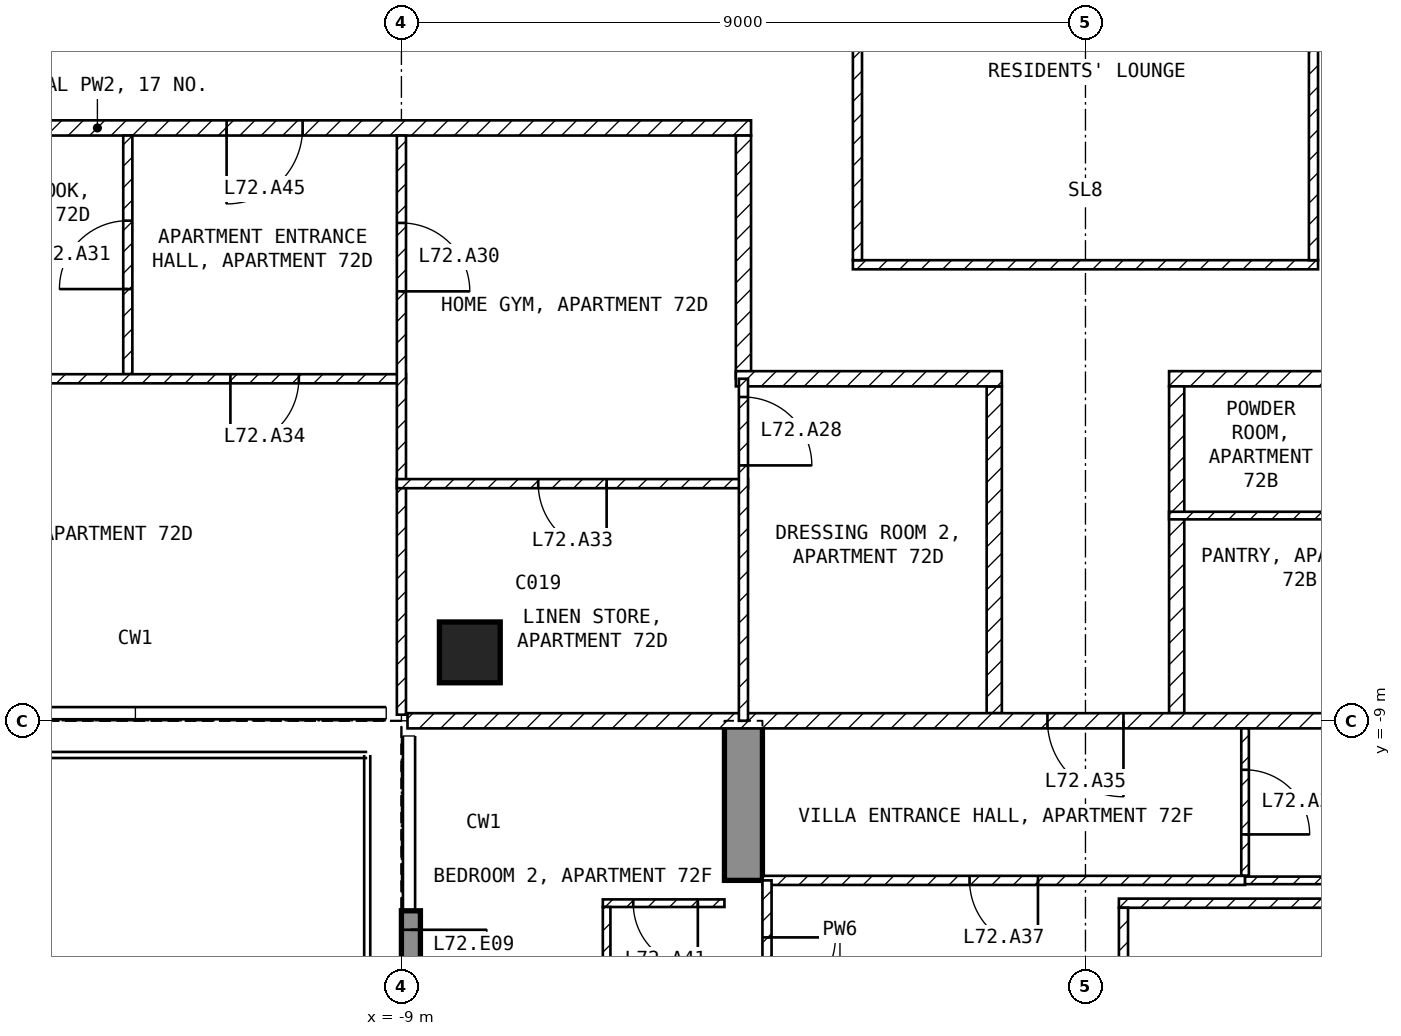
"""IFC4 building model, lengths in metres.
Left out: names, types, materials, properties, quantities, classifications, styles, units other than length and angle.
Written with IfcOpenShell. Run it as: python <this file> out.ifc"""

import sys

from ifc_helpers import new_model, si_unit, direction, frame, frame_2d, origin, origin_2d, place, context, subcontext, project, spatial, polyline, rectangle, outline, extrude, element, fill, save


model = new_model("IFC4")
c1 = context("Model", 3, precision=1e-05, world=origin(), true_north=direction((0.0, 1.0)))
c2 = subcontext(c1, "Body", "Model", "MODEL_VIEW")
j1 = project(units=[si_unit("LENGTHUNIT", "METRE"), si_unit("PLANEANGLEUNIT", "RADIAN")], contexts=[c1])
p1 = place(None, origin())
s1 = spatial("IfcSite", under=j1, at=p1, CompositionType="ELEMENT")
p2 = place(p1, origin())
s2 = spatial("IfcBuilding", under=s1, at=p2, CompositionType="ELEMENT")
p3 = place(p2, frame((0.0, 0.0, 281.5)))
s3 = spatial("IfcBuildingStorey", under=s2, at=p3, CompositionType="ELEMENT", Elevation=281.5)
p4 = place(p3, frame((-8.1, -8.1, -0.25), z_axis=(0.0, 0.0, 1.0), x_axis=(1.0, 0.0, 0.0)))
e1 = element("IfcColumn", 1, at=p4, inside=s3, PredefinedType="COLUMN", context=c2, shape_type="SweptSolid", body=[
    extrude(rectangle(XDim=0.8, YDim=0.8, at=origin_2d()), origin(), (0.0, 0.0, 1.0), 3.45),
])
p5 = place(p3, frame((-4.75, -16.7, -0.25), z_axis=(1.0, 0.0, 0.0), x_axis=(0.0, 1.0, 0.0)))
e2 = element("IfcWall", 2, at=p5, inside=s3, PredefinedType="SHEAR", context=c2, shape_type="SweptSolid", body=[
    extrude(outline(polyline([(0.0, 0.0), (3.2, 0.0), (3.2, 2.65), (5.6, 2.65), (5.6, 0.0), (7.7, 0.0), (7.7, 3.45), (0.0, 3.45), (0.0, 0.0)])), origin(), (0.0, 0.0, 1.0), 0.5),
])
p6 = place(p3, frame((-8.875, -11.5, 0.0), z_axis=(0.0, 0.0, 1.0), x_axis=(0.0, -1.0, 0.0)))
e3 = element("IfcWall", 3, at=p6, inside=s3, PredefinedType="SOLIDWALL", context=c2, shape_type="SweptSolid", body=[
    extrude(rectangle(XDim=2.7, YDim=0.25, at=frame_2d((1.35, 0.0))), origin(), (0.0, 0.0, 1.0), 3.2),
])
p7 = place(p6, frame((0.25, 0.0, 0.0)))
e4 = element("IfcOpeningElement", 4, at=p7, cuts=e3, PredefinedType="OPENING", context=c2, shape_type="SweptSolid", body=[
    extrude(rectangle(XDim=1.0, YDim=2.4, at=frame_2d((0.5, 1.2))), frame((0.0, 0.135, 0.0), z_axis=(0.0, -1.0, 0.0), x_axis=(1.0, 0.0, 0.0)), (0.0, 0.0, 1.0), 0.27),
])
p8 = place(p3, frame((-3.06, -3.0, 0.0), z_axis=(0.0, 0.0, 1.0), x_axis=(1.0, 0.0, 0.0)))
e5 = element("IfcWall", 5, at=p8, inside=s3, PredefinedType="PARTITIONING", context=c2, shape_type="SweptSolid", body=[
    extrude(rectangle(XDim=6.12, YDim=0.12, at=frame_2d((3.06, 0.0))), origin(), (0.0, 0.0, 1.0), 3.2),
])
for number, where, z_axis, x_axis in (
    (6, (3.0, -2.94, 0.0), (0.0, 0.0, 1.0), (0.0, 1.0, 0.0)),
    (7, (-3.0, 2.94, 0.0), (0.0, 0.0, 1.0), (0.0, -1.0, 0.0)),
):
    element("IfcWall", number, at=place(p3, frame(where, z_axis=z_axis, x_axis=x_axis)), inside=s3, PredefinedType="PARTITIONING", context=c2, shape_type="SweptSolid", body=[
        extrude(rectangle(XDim=5.88, YDim=0.12, at=frame_2d((2.94, 0.0))), origin(), (0.0, 0.0, 1.0), 3.2),
    ])
p9 = place(p3, frame((4.6, -4.5, 0.0), z_axis=(0.0, 0.0, 1.0), x_axis=(-1.0, 0.0, 0.0)))
e8 = element("IfcWall", 8, at=p9, inside=s3, PredefinedType="PARTITIONING", context=c2, shape_type="SweptSolid", body=[
    extrude(rectangle(XDim=3.5, YDim=0.2, at=frame_2d((1.75, 0.0))), origin(), (0.0, 0.0, 1.0), 3.2),
])
p10 = place(p3, frame((1.2, -4.6, 0.0), z_axis=(0.0, 0.0, 1.0), x_axis=(0.0, -1.0, 0.0)))
e9 = element("IfcWall", 9, at=p10, inside=s3, PredefinedType="PARTITIONING", context=c2, shape_type="SweptSolid", body=[
    extrude(rectangle(XDim=4.3, YDim=0.2, at=frame_2d((2.15, 0.0))), origin(), (0.0, 0.0, 1.0), 3.2),
])
p11 = place(p3, frame((-4.4, -1.2, 0.0), z_axis=(0.0, 0.0, 1.0), x_axis=(-1.0, 0.0, 0.0)))
e10 = element("IfcWall", 10, at=p11, inside=s3, PredefinedType="PARTITIONING", context=c2, shape_type="SweptSolid", body=[
    extrude(rectangle(XDim=17.2, YDim=0.2, at=frame_2d((8.6, 0.0))), origin(), (0.0, 0.0, 1.0), 3.2),
])
p12 = place(p11, frame((5.9, 0.0, 0.0)))
e11 = element("IfcOpeningElement", 11, at=p12, cuts=e10, PredefinedType="OPENING", context=c2, shape_type="SweptSolid", body=[
    extrude(rectangle(XDim=1.0, YDim=2.1, at=frame_2d((0.5, 1.05))), frame((0.0, 0.11, 0.0), z_axis=(0.0, -1.0, 0.0), x_axis=(1.0, 0.0, 0.0)), (0.0, 0.0, 1.0), 0.22),
])
p13 = place(p3, frame((-4.5, -4.5, 0.0), z_axis=(0.0, 0.0, 1.0), x_axis=(0.0, 1.0, 0.0)))
e12 = element("IfcWall", 12, at=p13, inside=s3, PredefinedType="PARTITIONING", context=c2, shape_type="SweptSolid", body=[
    extrude(rectangle(XDim=3.2, YDim=0.2, at=frame_2d((1.6, 0.0))), origin(), (0.0, 0.0, 1.0), 3.2),
])
p14 = place(p3, frame((-1.2, -8.9, 0.0), z_axis=(0.0, 0.0, 1.0), x_axis=(0.0, 1.0, 0.0)))
e13 = element("IfcWall", 13, at=p14, inside=s3, PredefinedType="PARTITIONING", context=c2, shape_type="SweptSolid", body=[
    extrude(rectangle(XDim=4.3, YDim=0.2, at=frame_2d((2.15, 0.0))), origin(), (0.0, 0.0, 1.0), 3.2),
])
p15 = place(p3, frame((-1.1, -4.5, 0.0), z_axis=(0.0, 0.0, 1.0), x_axis=(-1.0, 0.0, 0.0)))
e14 = element("IfcWall", 14, at=p15, inside=s3, PredefinedType="PARTITIONING", context=c2, shape_type="SweptSolid", body=[
    extrude(rectangle(XDim=3.5, YDim=0.2, at=frame_2d((1.75, 0.0))), origin(), (0.0, 0.0, 1.0), 3.2),
])
p16 = place(p3, frame((8.92, -9.0, 0.0), z_axis=(0.0, 0.0, 1.0), x_axis=(-1.0, 0.0, 0.0)))
e15 = element("IfcWall", 15, at=p16, inside=s3, PredefinedType="PARTITIONING", context=c2, shape_type="SweptSolid", body=[
    extrude(rectangle(XDim=17.84, YDim=0.2, at=frame_2d((8.92, 0.0))), origin(), (0.0, 0.0, 1.0), 3.2),
])
p17 = place(p16, frame((8.42, 0.0, 0.0)))
e16 = element("IfcOpeningElement", 16, at=p17, cuts=e15, PredefinedType="OPENING", context=c2, shape_type="SweptSolid", body=[
    extrude(rectangle(XDim=1.0, YDim=2.1, at=frame_2d((0.5, 1.05))), frame((0.0, 0.11, 0.0), z_axis=(0.0, -1.0, 0.0), x_axis=(1.0, 0.0, 0.0)), (0.0, 0.0, 1.0), 0.22),
])
p18 = place(p3, frame((4.56, -6.3, 0.0), z_axis=(0.0, 0.0, 1.0), x_axis=(-1.0, 0.0, 0.0)))
e17 = element("IfcWall", 17, at=p18, inside=s3, PredefinedType="PARTITIONING", context=c2, shape_type="SweptSolid", body=[
    extrude(rectangle(XDim=3.46, YDim=0.1, at=frame_2d((1.73, 0.0))), origin(), (0.0, 0.0, 1.0), 3.2),
])
p19 = place(p3, frame((-12.6, -4.44, 0.0), z_axis=(0.0, 0.0, 1.0), x_axis=(0.0, 1.0, 0.0)))
e18 = element("IfcWall", 18, at=p19, inside=s3, PredefinedType="PARTITIONING", context=c2, shape_type="SweptSolid", body=[
    extrude(rectangle(XDim=3.14, YDim=0.12, at=frame_2d((1.57, 0.0))), origin(), (0.0, 0.0, 1.0), 3.2),
])
p20 = place(p19, frame((1.12, 0.0, 0.0)))
e19 = element("IfcOpeningElement", 19, at=p20, cuts=e18, PredefinedType="OPENING", context=c2, shape_type="SweptSolid", body=[
    extrude(rectangle(XDim=0.9, YDim=2.1, at=frame_2d((0.45, 1.05))), frame((0.0, 0.07, 0.0), z_axis=(0.0, -1.0, 0.0), x_axis=(1.0, 0.0, 0.0)), (0.0, 0.0, 1.0), 0.14),
])
p21 = place(p3, frame((-8.94, -4.5, 0.0), z_axis=(0.0, 0.0, 1.0), x_axis=(-1.0, 0.0, 0.0)))
e20 = element("IfcWall", 20, at=p21, inside=s3, PredefinedType="PARTITIONING", context=c2, shape_type="SweptSolid", body=[
    extrude(rectangle(XDim=8.46, YDim=0.12, at=frame_2d((4.23, 0.0))), origin(), (0.0, 0.0, 1.0), 3.2),
])
p22 = place(p21, frame((7.11, 0.0, 0.0)))
e21 = element("IfcOpeningElement", 21, at=p22, cuts=e20, PredefinedType="OPENING", context=c2, shape_type="SweptSolid", body=[
    extrude(rectangle(XDim=0.9, YDim=2.1, at=frame_2d((0.45, 1.05))), frame((0.0, 0.07, 0.0), z_axis=(0.0, -1.0, 0.0), x_axis=(1.0, 0.0, 0.0)), (0.0, 0.0, 1.0), 0.14),
])
p23 = place(p21, frame((1.41, 0.0, 0.0)))
e22 = element("IfcOpeningElement", 22, at=p23, cuts=e20, PredefinedType="OPENING", context=c2, shape_type="SweptSolid", body=[
    extrude(rectangle(XDim=0.9, YDim=2.1, at=frame_2d((0.45, 1.05))), frame((0.0, 0.07, 0.0), z_axis=(0.0, -1.0, 0.0), x_axis=(1.0, 0.0, 0.0)), (0.0, 0.0, 1.0), 0.14),
])
p24 = place(p3, frame((-9.0, -1.3, 0.0), z_axis=(0.0, 0.0, 1.0), x_axis=(0.0, -1.0, 0.0)))
e23 = element("IfcWall", 23, at=p24, inside=s3, PredefinedType="PARTITIONING", context=c2, shape_type="SweptSolid", body=[
    extrude(rectangle(XDim=7.62, YDim=0.12, at=frame_2d((3.81, 0.0))), origin(), (0.0, 0.0, 1.0), 3.2),
])
p25 = place(p24, frame((1.15, 0.0, 0.0)))
e24 = element("IfcOpeningElement", 24, at=p25, cuts=e23, PredefinedType="OPENING", context=c2, shape_type="SweptSolid", body=[
    extrude(rectangle(XDim=0.9, YDim=2.1, at=frame_2d((0.45, 1.05))), frame((0.0, 0.07, 0.0), z_axis=(0.0, -1.0, 0.0), x_axis=(1.0, 0.0, 0.0)), (0.0, 0.0, 1.0), 0.14),
])
p26 = place(p3, frame((-4.44, -5.88, 0.0), z_axis=(0.0, 0.0, 1.0), x_axis=(-1.0, 0.0, 0.0)))
e25 = element("IfcWall", 25, at=p26, inside=s3, PredefinedType="PARTITIONING", context=c2, shape_type="SweptSolid", body=[
    extrude(rectangle(XDim=4.62, YDim=0.12, at=frame_2d((2.31, 0.0))), origin(), (0.0, 0.0, 1.0), 3.2),
])
p27 = place(p26, frame((1.86, 0.0, 0.0)))
e26 = element("IfcOpeningElement", 26, at=p27, cuts=e25, PredefinedType="OPENING", context=c2, shape_type="SweptSolid", body=[
    extrude(rectangle(XDim=0.9, YDim=2.1, at=frame_2d((0.45, 1.05))), frame((0.0, 0.07, 0.0), z_axis=(0.0, -1.0, 0.0), x_axis=(1.0, 0.0, 0.0)), (0.0, 0.0, 1.0), 0.14),
])
p28 = place(p3, frame((-4.5, -4.5, 0.0), z_axis=(0.0, 0.0, 1.0), x_axis=(0.0, -1.0, 0.0)))
e27 = element("IfcWall", 27, at=p28, inside=s3, PredefinedType="PARTITIONING", context=c2, shape_type="SweptSolid", body=[
    extrude(rectangle(XDim=4.5, YDim=0.12, at=frame_2d((2.25, 0.0))), origin(), (0.0, 0.0, 1.0), 3.2),
])
p29 = place(p28, frame((0.24, 0.0, 0.0)))
e28 = element("IfcOpeningElement", 28, at=p29, cuts=e27, PredefinedType="OPENING", context=c2, shape_type="SweptSolid", body=[
    extrude(rectangle(XDim=0.9, YDim=2.1, at=frame_2d((0.45, 1.05))), frame((0.0, 0.07, 0.0), z_axis=(0.0, -1.0, 0.0), x_axis=(1.0, 0.0, 0.0)), (0.0, 0.0, 1.0), 0.14),
])
p30 = place(p3, frame((2.1, -9.1, 0.0), z_axis=(0.0, 0.0, 1.0), x_axis=(0.0, -1.0, 0.0)))
e29 = element("IfcWall", 29, at=p30, inside=s3, PredefinedType="PARTITIONING", context=c2, shape_type="SweptSolid", body=[
    extrude(rectangle(XDim=1.94, YDim=0.1, at=frame_2d((0.97, 0.0))), origin(), (0.0, 0.0, 1.0), 3.2),
])
p31 = place(p30, frame((0.545, 0.0, 0.0)))
e30 = element("IfcOpeningElement", 30, at=p31, cuts=e29, PredefinedType="OPENING", context=c2, shape_type="SweptSolid", body=[
    extrude(rectangle(XDim=0.85, YDim=2.1, at=frame_2d((0.425, 1.05))), frame((0.0, 0.06, 0.0), z_axis=(0.0, -1.0, 0.0), x_axis=(1.0, 0.0, 0.0)), (0.0, 0.0, 1.0), 0.12),
])
p32 = place(p3, frame((2.1, -11.1, 0.0), z_axis=(0.0, 0.0, 1.0), x_axis=(-1.0, 0.0, 0.0)))
e31 = element("IfcWall", 31, at=p32, inside=s3, PredefinedType="PARTITIONING", context=c2, shape_type="SweptSolid", body=[
    extrude(rectangle(XDim=6.35, YDim=0.12, at=frame_2d((3.175, 0.0))), origin(), (0.0, 0.0, 1.0), 3.2),
])
p33 = place(p32, frame((2.725, 0.0, 0.0)))
e32 = element("IfcOpeningElement", 32, at=p33, cuts=e31, PredefinedType="OPENING", context=c2, shape_type="SweptSolid", body=[
    extrude(rectangle(XDim=0.9, YDim=2.1, at=frame_2d((0.45, 1.05))), frame((0.0, 0.07, 0.0), z_axis=(0.0, -1.0, 0.0), x_axis=(1.0, 0.0, 0.0)), (0.0, 0.0, 1.0), 0.14),
])
p34 = place(p3, frame((4.25, -11.1, 0.0), z_axis=(0.0, 0.0, 1.0), x_axis=(-1.0, 0.0, 0.0)))
e33 = element("IfcWall", 33, at=p34, inside=s3, PredefinedType="PARTITIONING", context=c2, shape_type="SweptSolid", body=[
    extrude(rectangle(XDim=2.15, YDim=0.1, at=frame_2d((1.075, 0.0))), origin(), (0.0, 0.0, 1.0), 3.2),
])
p35 = place(p3, frame((4.25, -11.4, 0.0), z_axis=(0.0, 0.0, 1.0), x_axis=(-1.0, 0.0, 0.0)))
e34 = element("IfcWall", 34, at=p35, inside=s3, PredefinedType="PARTITIONING", context=c2, shape_type="SweptSolid", body=[
    extrude(rectangle(XDim=3.81, YDim=0.12, at=frame_2d((1.905, 0.0))), origin(), (0.0, 0.0, 1.0), 3.2),
])
p36 = place(p3, frame((0.5, -11.46, 0.0), z_axis=(0.0, 0.0, 1.0), x_axis=(0.0, -1.0, 0.0)))
e35 = element("IfcWall", 35, at=p36, inside=s3, PredefinedType="PARTITIONING", context=c2, shape_type="SweptSolid", body=[
    extrude(rectangle(XDim=2.88, YDim=0.12, at=frame_2d((1.44, 0.0))), origin(), (0.0, 0.0, 1.0), 3.2),
])
p37 = place(p36, frame((0.99, 0.0, 0.0)))
e36 = element("IfcOpeningElement", 36, at=p37, cuts=e35, PredefinedType="OPENING", context=c2, shape_type="SweptSolid", body=[
    extrude(rectangle(XDim=0.9, YDim=2.1, at=frame_2d((0.45, 1.05))), frame((0.0, 0.07, 0.0), z_axis=(0.0, -1.0, 0.0), x_axis=(1.0, 0.0, 0.0)), (0.0, 0.0, 1.0), 0.14),
])
p38 = place(p3, frame((-4.75, -11.4, 0.0), z_axis=(0.0, 0.0, 1.0), x_axis=(-1.0, 0.0, 0.0)))
e37 = element("IfcWall", 37, at=p38, inside=s3, PredefinedType="PARTITIONING", context=c2, shape_type="SweptSolid", body=[
    extrude(rectangle(XDim=1.6, YDim=0.1, at=frame_2d((0.8, 0.0))), origin(), (0.0, 0.0, 1.0), 3.2),
])
p39 = place(p38, frame((0.35, 0.0, 0.0)))
e38 = element("IfcOpeningElement", 38, at=p39, cuts=e37, PredefinedType="OPENING", context=c2, shape_type="SweptSolid", body=[
    extrude(rectangle(XDim=0.85, YDim=2.1, at=frame_2d((0.425, 1.05))), frame((0.0, 0.06, 0.0), z_axis=(0.0, -1.0, 0.0), x_axis=(1.0, 0.0, 0.0)), (0.0, 0.0, 1.0), 0.12),
])
p40 = place(p3, frame((-6.3, -11.45, 0.0), z_axis=(0.0, 0.0, 1.0), x_axis=(0.0, -1.0, 0.0)))
e39 = element("IfcWall", 39, at=p40, inside=s3, PredefinedType="PARTITIONING", context=c2, shape_type="SweptSolid", body=[
    extrude(rectangle(XDim=2.89, YDim=0.1, at=frame_2d((1.445, 0.0))), origin(), (0.0, 0.0, 1.0), 3.2),
])
p41 = place(p3, frame((-4.19, -11.1, 0.0), z_axis=(0.0, 0.0, 1.0), x_axis=(0.0, -1.0, 0.0)))
e40 = element("IfcWall", 40, at=p41, inside=s3, PredefinedType="PARTITIONING", context=c2, shape_type="SweptSolid", body=[
    extrude(rectangle(XDim=2.4, YDim=0.12, at=frame_2d((1.2, 0.0))), origin(), (0.0, 0.0, 1.0), 2.4),
])
p42 = place(p41, frame((0.75, 0.0, 0.0)))
e41 = element("IfcOpeningElement", 41, at=p42, cuts=e40, PredefinedType="OPENING", context=c2, shape_type="SweptSolid", body=[
    extrude(rectangle(XDim=0.9, YDim=2.1, at=frame_2d((0.45, 1.05))), frame((0.0, 0.07, 0.0), z_axis=(0.0, -1.0, 0.0), x_axis=(1.0, 0.0, 0.0)), (0.0, 0.0, 1.0), 0.14),
])
p43 = place(p7, origin())
e42 = element("IfcDoor", 42, at=p43, inside=s3, OperationType="SINGLE_SWING_LEFT", PredefinedType="DOOR", context=c2, shape_type="SweptSolid", body=[
    extrude(rectangle(XDim=1.0, YDim=2.4, at=frame_2d((0.5, 1.2))), frame((0.0, 0.025, 0.0), z_axis=(0.0, -1.0, 0.0), x_axis=(1.0, 0.0, 0.0)), (0.0, 0.0, 1.0), 0.05),
])
fill(e4, e42)
p44 = place(p29, origin())
e43 = element("IfcDoor", 43, at=p44, inside=s3, OperationType="SINGLE_SWING_RIGHT", PredefinedType="DOOR", context=c2, shape_type="SweptSolid", body=[
    extrude(rectangle(XDim=0.9, YDim=2.1, at=frame_2d((0.45, 1.05))), frame((0.0, 0.025, 0.0), z_axis=(0.0, -1.0, 0.0), x_axis=(1.0, 0.0, 0.0)), (0.0, 0.0, 1.0), 0.05),
])
fill(e28, e43)
p45 = place(p25, origin())
e44 = element("IfcDoor", 44, at=p45, inside=s3, OperationType="SINGLE_SWING_RIGHT", PredefinedType="DOOR", context=c2, shape_type="SweptSolid", body=[
    extrude(rectangle(XDim=0.9, YDim=2.1, at=frame_2d((0.45, 1.05))), frame((0.0, 0.025, 0.0), z_axis=(0.0, -1.0, 0.0), x_axis=(1.0, 0.0, 0.0)), (0.0, 0.0, 1.0), 0.05),
])
fill(e24, e44)
p46 = place(p20, origin())
e45 = element("IfcDoor", 45, at=p46, inside=s3, OperationType="SINGLE_SWING_LEFT", PredefinedType="DOOR", context=c2, shape_type="SweptSolid", body=[
    extrude(rectangle(XDim=0.9, YDim=2.1, at=frame_2d((0.45, 1.05))), frame((0.0, 0.025, 0.0), z_axis=(0.0, -1.0, 0.0), x_axis=(1.0, 0.0, 0.0)), (0.0, 0.0, 1.0), 0.05),
])
fill(e19, e45)
p47 = place(p27, origin())
e46 = element("IfcDoor", 46, at=p47, inside=s3, OperationType="SINGLE_SWING_LEFT", PredefinedType="DOOR", context=c2, shape_type="SweptSolid", body=[
    extrude(rectangle(XDim=0.9, YDim=2.1, at=frame_2d((0.45, 1.05))), frame((0.0, 0.025, 0.0), z_axis=(0.0, -1.0, 0.0), x_axis=(1.0, 0.0, 0.0)), (0.0, 0.0, 1.0), 0.05),
])
fill(e26, e46)
p48 = place(p23, origin())
e47 = element("IfcDoor", 47, at=p48, inside=s3, OperationType="SINGLE_SWING_RIGHT", PredefinedType="DOOR", context=c2, shape_type="SweptSolid", body=[
    extrude(rectangle(XDim=0.9, YDim=2.1, at=frame_2d((0.45, 1.05))), frame((0.0, 0.025, 0.0), z_axis=(0.0, -1.0, 0.0), x_axis=(1.0, 0.0, 0.0)), (0.0, 0.0, 1.0), 0.05),
])
fill(e22, e47)
p49 = place(p17, origin())
e48 = element("IfcDoor", 48, at=p49, inside=s3, OperationType="SINGLE_SWING_LEFT", PredefinedType="DOOR", context=c2, shape_type="SweptSolid", body=[
    extrude(rectangle(XDim=1.0, YDim=2.1, at=frame_2d((0.5, 1.05))), frame((0.0, 0.025, 0.0), z_axis=(0.0, -1.0, 0.0), x_axis=(1.0, 0.0, 0.0)), (0.0, 0.0, 1.0), 0.05),
])
fill(e16, e48)
p50 = place(p31, origin())
e49 = element("IfcDoor", 49, at=p50, inside=s3, OperationType="SINGLE_SWING_RIGHT", PredefinedType="DOOR", context=c2, shape_type="SweptSolid", body=[
    extrude(rectangle(XDim=0.85, YDim=2.1, at=frame_2d((0.425, 1.05))), frame((0.0, 0.025, 0.0), z_axis=(0.0, -1.0, 0.0), x_axis=(1.0, 0.0, 0.0)), (0.0, 0.0, 1.0), 0.05),
])
fill(e30, e49)
p51 = place(p33, origin())
e50 = element("IfcDoor", 50, at=p51, inside=s3, OperationType="SINGLE_SWING_LEFT", PredefinedType="DOOR", context=c2, shape_type="SweptSolid", body=[
    extrude(rectangle(XDim=0.9, YDim=2.1, at=frame_2d((0.45, 1.05))), frame((0.0, 0.025, 0.0), z_axis=(0.0, -1.0, 0.0), x_axis=(1.0, 0.0, 0.0)), (0.0, 0.0, 1.0), 0.05),
])
fill(e32, e50)
p52 = place(p39, origin())
e51 = element("IfcDoor", 51, at=p52, inside=s3, OperationType="SINGLE_SWING_LEFT", PredefinedType="DOOR", context=c2, shape_type="SweptSolid", body=[
    extrude(rectangle(XDim=0.85, YDim=2.1, at=frame_2d((0.425, 1.05))), frame((0.0, 0.025, 0.0), z_axis=(0.0, -1.0, 0.0), x_axis=(1.0, 0.0, 0.0)), (0.0, 0.0, 1.0), 0.05),
])
fill(e38, e51)
p53 = place(p12, origin())
e52 = element("IfcDoor", 52, at=p53, inside=s3, OperationType="SINGLE_SWING_RIGHT", PredefinedType="DOOR", context=c2, shape_type="SweptSolid", body=[
    extrude(rectangle(XDim=1.0, YDim=2.1, at=frame_2d((0.5, 1.05))), frame((0.0, 0.025, 0.0), z_axis=(0.0, -1.0, 0.0), x_axis=(1.0, 0.0, 0.0)), (0.0, 0.0, 1.0), 0.05),
])
fill(e11, e52)
p54 = place(p42, origin())
e53 = element("IfcDoor", 53, at=p54, inside=s3, OperationType="SINGLE_SWING_LEFT", PredefinedType="DOOR", context=c2, shape_type="SweptSolid", body=[
    extrude(rectangle(XDim=0.9, YDim=2.1, at=frame_2d((0.45, 1.05))), frame((0.0, 0.025, 0.0), z_axis=(0.0, -1.0, 0.0), x_axis=(1.0, 0.0, 0.0)), (0.0, 0.0, 1.0), 0.05),
])
fill(e41, e53)
save(model, sys.argv[1])
